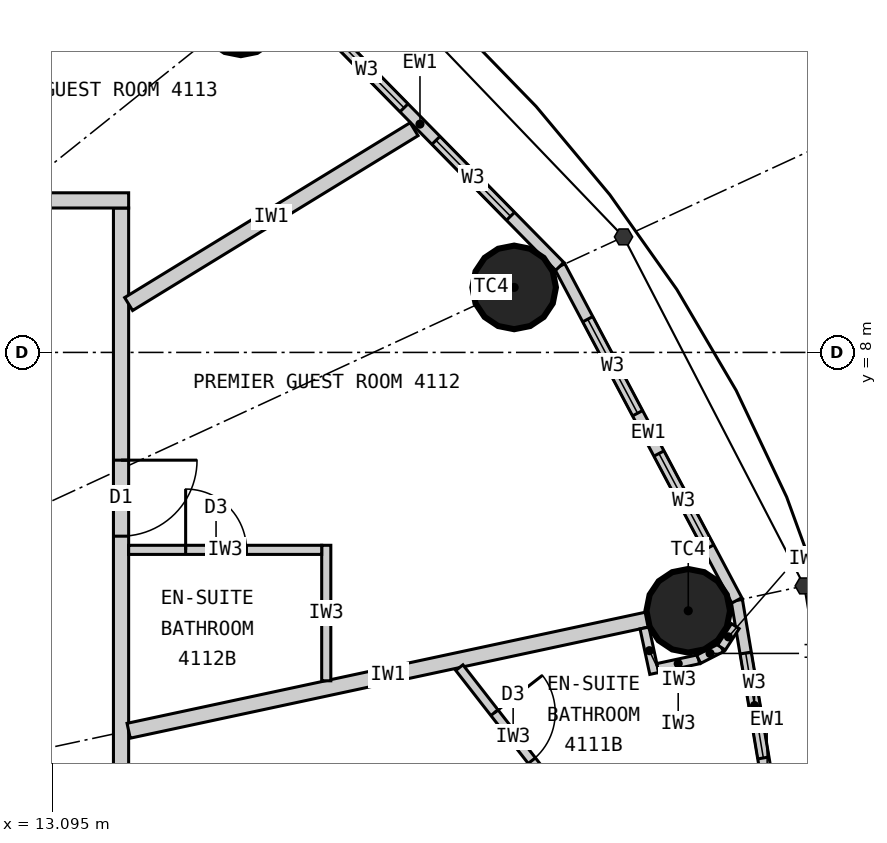
"""IFC4 building model, lengths in metres.
Left out: names, types, materials, properties, quantities, classifications, styles, units other than length and angle.
Written with IfcOpenShell. Run it as: python <this file> out.ifc"""

import sys

from ifc_helpers import new_model, si_unit, direction, frame, frame_2d, origin, origin_2d, place, context, subcontext, project, spatial, rectangle, circle, extrude, element, fill, save


model = new_model("IFC4")
c1 = context("Model", 3, precision=1e-05, world=origin(), true_north=direction((0.0, 1.0)))
c2 = subcontext(c1, "Body", "Model", "MODEL_VIEW")
j1 = project(units=[si_unit("LENGTHUNIT", "METRE"), si_unit("PLANEANGLEUNIT", "RADIAN")], contexts=[c1])
p1 = place(None, origin())
s1 = spatial("IfcSite", under=j1, at=p1, CompositionType="ELEMENT")
p2 = place(p1, origin())
s2 = spatial("IfcBuilding", under=s1, at=p2, CompositionType="ELEMENT")
p3 = place(p2, frame((0.0, 0.0, 156.6)))
s3 = spatial("IfcBuildingStorey", under=s2, at=p3, CompositionType="ELEMENT", Elevation=156.6)
for number, where, z_axis, x_axis in (
    (1, (21.463, 4.601, 0.0), (0.0, 0.0, 1.0), (1.0, 0.0, 0.0)),
    (2, (19.172, 8.855, 0.0), (0.0, 0.0, 1.0), (1.0, 0.0, 0.0)),
    (3, (15.576, 12.461, 0.0), (0.0, 0.0, 1.0), (1.0, 0.0, 0.0)),
):
    element("IfcColumn", number, at=place(p3, frame(where, z_axis=z_axis, x_axis=x_axis)), inside=s3, PredefinedType="COLUMN", context=c2, shape_type="SweptSolid", body=[
        extrude(circle(Radius=0.55, at=origin_2d()), origin(), (0.0, 0.0, 1.0), 3.3),
    ])
p4 = place(p3, frame((22.9, 0.0, 0.0), z_axis=(0.0, 0.0, 1.0), x_axis=(-0.166162111254, 0.986098449843, 0.0)))
e4 = element("IfcWall", 4, at=p4, inside=s3, PredefinedType="ELEMENTEDWALL", context=c2, shape_type="SweptSolid", body=[
    extrude(rectangle(XDim=4.805, YDim=0.15, at=frame_2d((2.402, 0.0))), origin(), (0.0, 0.0, 1.0), 3.12),
])
p5 = place(p4, frame((0.702, 0.0, 0.9)))
e5 = element("IfcOpeningElement", 5, at=p5, cuts=e4, PredefinedType="OPENING", context=c2, shape_type="SweptSolid", body=[
    extrude(rectangle(XDim=1.4, YDim=1.9, at=frame_2d((0.7, 0.95))), frame((0.0, 0.085, 0.0), z_axis=(0.0, -1.0, 0.0), x_axis=(1.0, 0.0, 0.0)), (0.0, 0.0, 1.0), 0.17),
])
p6 = place(p4, frame((2.702, 0.0, 0.9)))
e6 = element("IfcOpeningElement", 6, at=p6, cuts=e4, PredefinedType="OPENING", context=c2, shape_type="SweptSolid", body=[
    extrude(rectangle(XDim=1.4, YDim=1.9, at=frame_2d((0.7, 0.95))), frame((0.0, 0.085, 0.0), z_axis=(0.0, -1.0, 0.0), x_axis=(1.0, 0.0, 0.0)), (0.0, 0.0, 1.0), 0.17),
])
p7 = place(p3, frame((22.102, 4.738, 0.0), z_axis=(0.0, 0.0, 1.0), x_axis=(-0.468428906714, 0.883501193748, 0.0)))
e7 = element("IfcWall", 7, at=p7, inside=s3, PredefinedType="ELEMENTEDWALL", context=c2, shape_type="SweptSolid", body=[
    extrude(rectangle(XDim=4.974, YDim=0.15, at=frame_2d((2.487, 0.0))), origin(), (0.0, 0.0, 1.0), 3.12),
])
p8 = place(p7, frame((0.787, 0.0, 0.9)))
e8 = element("IfcOpeningElement", 8, at=p8, cuts=e7, PredefinedType="OPENING", context=c2, shape_type="SweptSolid", body=[
    extrude(rectangle(XDim=1.4, YDim=1.9, at=frame_2d((0.7, 0.95))), frame((0.0, 0.085, 0.0), z_axis=(0.0, -1.0, 0.0), x_axis=(1.0, 0.0, 0.0)), (0.0, 0.0, 1.0), 0.17),
])
p9 = place(p7, frame((2.787, 0.0, 0.9)))
e9 = element("IfcOpeningElement", 9, at=p9, cuts=e7, PredefinedType="OPENING", context=c2, shape_type="SweptSolid", body=[
    extrude(rectangle(XDim=1.4, YDim=1.9, at=frame_2d((0.7, 0.95))), frame((0.0, 0.085, 0.0), z_axis=(0.0, -1.0, 0.0), x_axis=(1.0, 0.0, 0.0)), (0.0, 0.0, 1.0), 0.17),
])
p10 = place(p3, frame((19.772, 9.132, 0.0), z_axis=(0.0, 0.0, 1.0), x_axis=(-0.700727467776, 0.71342905457, 0.0)))
e10 = element("IfcWall", 10, at=p10, inside=s3, PredefinedType="ELEMENTEDWALL", context=c2, shape_type="SweptSolid", body=[
    extrude(rectangle(XDim=5.247, YDim=0.15, at=frame_2d((2.624, 0.0))), origin(), (0.0, 0.0, 1.0), 3.12),
])
p11 = place(p10, frame((0.924, 0.0, 0.9)))
e11 = element("IfcOpeningElement", 11, at=p11, cuts=e10, PredefinedType="OPENING", context=c2, shape_type="SweptSolid", body=[
    extrude(rectangle(XDim=1.4, YDim=1.9, at=frame_2d((0.7, 0.95))), frame((0.0, 0.085, 0.0), z_axis=(0.0, -1.0, 0.0), x_axis=(1.0, 0.0, 0.0)), (0.0, 0.0, 1.0), 0.17),
])
p12 = place(p10, frame((2.924, 0.0, 0.9)))
e12 = element("IfcOpeningElement", 12, at=p12, cuts=e10, PredefinedType="OPENING", context=c2, shape_type="SweptSolid", body=[
    extrude(rectangle(XDim=1.4, YDim=1.9, at=frame_2d((0.7, 0.95))), frame((0.0, 0.085, 0.0), z_axis=(0.0, -1.0, 0.0), x_axis=(1.0, 0.0, 0.0)), (0.0, 0.0, 1.0), 0.17),
])
p13 = place(p3, frame((14.0, -9.9, 0.0), z_axis=(0.0, 0.0, 1.0), x_axis=(0.0, 1.0, 0.0)))
e13 = element("IfcWall", 13, at=p13, inside=s3, PredefinedType="PARTITIONING", context=c2, shape_type="SweptSolid", body=[
    extrude(rectangle(XDim=19.8, YDim=0.2, at=frame_2d((9.9, 0.0))), origin(), (0.0, 0.0, 1.0), 3.12),
])
p14 = place(p13, frame((3.824, 0.0, 0.0)))
e14 = element("IfcOpeningElement", 14, at=p14, cuts=e13, PredefinedType="OPENING", context=c2, shape_type="SweptSolid", body=[
    extrude(rectangle(XDim=1.0, YDim=2.2, at=frame_2d((0.5, 1.1))), frame((0.0, 0.11, 0.0), z_axis=(0.0, -1.0, 0.0), x_axis=(1.0, 0.0, 0.0)), (0.0, 0.0, 1.0), 0.22),
])
p15 = place(p13, frame((8.719, 0.0, 0.0)))
e15 = element("IfcOpeningElement", 15, at=p15, cuts=e13, PredefinedType="OPENING", context=c2, shape_type="SweptSolid", body=[
    extrude(rectangle(XDim=1.0, YDim=2.2, at=frame_2d((0.5, 1.1))), frame((0.0, 0.11, 0.0), z_axis=(0.0, -1.0, 0.0), x_axis=(1.0, 0.0, 0.0)), (0.0, 0.0, 1.0), 0.22),
])
p16 = place(p13, frame((15.482, 0.0, 0.0)))
e16 = element("IfcOpeningElement", 16, at=p16, cuts=e13, PredefinedType="OPENING", context=c2, shape_type="SweptSolid", body=[
    extrude(rectangle(XDim=1.0, YDim=2.2, at=frame_2d((0.5, 1.1))), frame((0.0, 0.11, 0.0), z_axis=(0.0, -1.0, 0.0), x_axis=(1.0, 0.0, 0.0)), (0.0, 0.0, 1.0), 0.22),
])
p17 = place(p3, frame((14.1, 3.022, 0.0), z_axis=(0.0, 0.0, 1.0), x_axis=(0.977790639684, 0.209584028367, 0.0)))
e17 = element("IfcWall", 17, at=p17, inside=s3, PredefinedType="PARTITIONING", context=c2, shape_type="SweptSolid", body=[
    extrude(rectangle(XDim=6.98, YDim=0.2, at=frame_2d((3.49, 0.0))), origin(), (0.0, 0.0, 1.0), 2.42),
])
p18 = place(p3, frame((14.1, 8.636, 0.0), z_axis=(0.0, 0.0, 1.0), x_axis=(0.852731884196, 0.522348862041, 0.0)))
e18 = element("IfcWall", 18, at=p18, inside=s3, PredefinedType="PARTITIONING", context=c2, shape_type="SweptSolid", body=[
    extrude(rectangle(XDim=4.404, YDim=0.2, at=frame_2d((2.202, 0.0))), origin(), (0.0, 0.0, 1.0), 3.12),
])
p19 = place(p3, frame((18.451, 3.853, 0.0), z_axis=(0.0, 0.0, 1.0), x_axis=(0.614703538382, -0.788758239197, 0.0)))
e19 = element("IfcWall", 19, at=p19, inside=s3, PredefinedType="PARTITIONING", context=c2, shape_type="SweptSolid", body=[
    extrude(rectangle(XDim=2.303, YDim=0.12, at=frame_2d((1.152, 0.0))), origin(), (0.0, 0.0, 1.0), 3.12),
])
p20 = place(p19, frame((0.752, 0.0, 0.0)))
e20 = element("IfcOpeningElement", 20, at=p20, cuts=e19, PredefinedType="OPENING", context=c2, shape_type="SweptSolid", body=[
    extrude(rectangle(XDim=0.8, YDim=2.1, at=frame_2d((0.4, 1.05))), frame((0.0, 0.07, 0.0), z_axis=(0.0, -1.0, 0.0), x_axis=(1.0, 0.0, 0.0)), (0.0, 0.0, 1.0), 0.14),
])
p21 = place(p3, frame((20.887, 4.375, 0.0), z_axis=(0.0, 0.0, 1.0), x_axis=(0.209746941802, -0.977755705892, 0.0)))
e21 = element("IfcWall", 21, at=p21, inside=s3, PredefinedType="PARTITIONING", context=c2, shape_type="SweptSolid", body=[
    extrude(rectangle(XDim=0.612, YDim=0.12, at=frame_2d((0.306, 0.0))), origin(), (0.0, 0.0, 1.0), 3.12),
])
p22 = place(p3, frame((21.062, 3.848, 0.0), z_axis=(0.0, 0.0, 1.0), x_axis=(0.977789415726, 0.209589738521, 0.0)))
e22 = element("IfcWall", 22, at=p22, inside=s3, PredefinedType="PARTITIONING", context=c2, shape_type="SweptSolid", body=[
    extrude(rectangle(XDim=0.55, YDim=0.12, at=frame_2d((0.275, 0.0))), origin(), (0.0, 0.0, 1.0), 3.12),
])
p23 = place(p3, frame((21.599, 3.963, 0.0), z_axis=(0.0, 0.0, 1.0), x_axis=(0.890193602875, 0.455582428766, 0.0)))
e23 = element("IfcWall", 23, at=p23, inside=s3, PredefinedType="PARTITIONING", context=c2, shape_type="SweptSolid", body=[
    extrude(rectangle(XDim=0.338, YDim=0.12, at=frame_2d((0.169, 0.0))), origin(), (0.0, 0.0, 1.0), 3.12),
])
p24 = place(p3, frame((21.9, 4.117, 0.0), z_axis=(0.0, 0.0, 1.0), x_axis=(0.543582688681, 0.839355622228, 0.0)))
e24 = element("IfcWall", 24, at=p24, inside=s3, PredefinedType="PARTITIONING", context=c2, shape_type="SweptSolid", body=[
    extrude(rectangle(XDim=0.336, YDim=0.12, at=frame_2d((0.168, 0.0))), origin(), (0.0, 0.0, 1.0), 3.12),
])
p25 = place(p3, frame((16.7, 3.68, 0.0), z_axis=(0.0, 0.0, 1.0), x_axis=(0.0, 1.0, 0.0)))
e25 = element("IfcWall", 25, at=p25, inside=s3, PredefinedType="PARTITIONING", context=c2, shape_type="SweptSolid", body=[
    extrude(rectangle(XDim=1.783, YDim=0.12, at=frame_2d((0.891, 0.0))), origin(), (0.0, 0.0, 1.0), 3.12),
])
p26 = place(p3, frame((14.1, 5.403, 0.0), z_axis=(0.0, 0.0, 1.0), x_axis=(1.0, 0.0, 0.0)))
e26 = element("IfcWall", 26, at=p26, inside=s3, PredefinedType="PARTITIONING", context=c2, shape_type="SweptSolid", body=[
    extrude(rectangle(XDim=2.54, YDim=0.12, at=frame_2d((1.27, 0.0))), origin(), (0.0, 0.0, 1.0), 3.12),
])
p27 = place(p26, frame((0.75, 0.0, 0.0)))
e27 = element("IfcOpeningElement", 27, at=p27, cuts=e26, PredefinedType="OPENING", context=c2, shape_type="SweptSolid", body=[
    extrude(rectangle(XDim=0.8, YDim=2.1, at=frame_2d((0.4, 1.05))), frame((0.0, 0.07, 0.0), z_axis=(0.0, -1.0, 0.0), x_axis=(1.0, 0.0, 0.0)), (0.0, 0.0, 1.0), 0.14),
])
p28 = place(p3, frame((3.518, 10.0, 0.0), z_axis=(0.0, 0.0, 1.0), x_axis=(1.0, 0.0, 0.0)))
e28 = element("IfcWall", 28, at=p28, inside=s3, PredefinedType="PARTITIONING", context=c2, shape_type="SweptSolid", body=[
    extrude(rectangle(XDim=10.582, YDim=0.2, at=frame_2d((5.291, 0.0))), origin(), (0.0, 0.0, 1.0), 3.12),
])
p29 = place(p28, frame((4.621, 0.0, 0.0)))
e29 = element("IfcOpeningElement", 29, at=p29, cuts=e28, PredefinedType="OPENING", context=c2, shape_type="SweptSolid", body=[
    extrude(rectangle(XDim=1.0, YDim=2.2, at=frame_2d((0.5, 1.1))), frame((0.0, 0.11, 0.0), z_axis=(0.0, -1.0, 0.0), x_axis=(1.0, 0.0, 0.0)), (0.0, 0.0, 1.0), 0.22),
])
p30 = place(p6, origin())
e30 = element("IfcWindow", 30, at=p30, inside=s3, PartitioningType="SINGLE_PANEL", PredefinedType="WINDOW", context=c2, shape_type="SweptSolid", body=[
    extrude(rectangle(XDim=1.4, YDim=1.9, at=frame_2d((0.7, 0.95))), frame((0.0, 0.03, 0.0), z_axis=(0.0, -1.0, 0.0), x_axis=(1.0, 0.0, 0.0)), (0.0, 0.0, 1.0), 0.06),
])
fill(e6, e30)
p31 = place(p8, origin())
e31 = element("IfcWindow", 31, at=p31, inside=s3, PartitioningType="SINGLE_PANEL", PredefinedType="WINDOW", context=c2, shape_type="SweptSolid", body=[
    extrude(rectangle(XDim=1.4, YDim=1.9, at=frame_2d((0.7, 0.95))), frame((0.0, 0.03, 0.0), z_axis=(0.0, -1.0, 0.0), x_axis=(1.0, 0.0, 0.0)), (0.0, 0.0, 1.0), 0.06),
])
fill(e8, e31)
p32 = place(p9, origin())
e32 = element("IfcWindow", 32, at=p32, inside=s3, PartitioningType="SINGLE_PANEL", PredefinedType="WINDOW", context=c2, shape_type="SweptSolid", body=[
    extrude(rectangle(XDim=1.4, YDim=1.9, at=frame_2d((0.7, 0.95))), frame((0.0, 0.03, 0.0), z_axis=(0.0, -1.0, 0.0), x_axis=(1.0, 0.0, 0.0)), (0.0, 0.0, 1.0), 0.06),
])
fill(e9, e32)
p33 = place(p11, origin())
e33 = element("IfcWindow", 33, at=p33, inside=s3, PartitioningType="SINGLE_PANEL", PredefinedType="WINDOW", context=c2, shape_type="SweptSolid", body=[
    extrude(rectangle(XDim=1.4, YDim=1.9, at=frame_2d((0.7, 0.95))), frame((0.0, 0.03, 0.0), z_axis=(0.0, -1.0, 0.0), x_axis=(1.0, 0.0, 0.0)), (0.0, 0.0, 1.0), 0.06),
])
fill(e11, e33)
p34 = place(p12, origin())
e34 = element("IfcWindow", 34, at=p34, inside=s3, PartitioningType="SINGLE_PANEL", PredefinedType="WINDOW", context=c2, shape_type="SweptSolid", body=[
    extrude(rectangle(XDim=1.4, YDim=1.9, at=frame_2d((0.7, 0.95))), frame((0.0, 0.03, 0.0), z_axis=(0.0, -1.0, 0.0), x_axis=(1.0, 0.0, 0.0)), (0.0, 0.0, 1.0), 0.06),
])
fill(e12, e34)
p35 = place(p20, origin())
e35 = element("IfcDoor", 35, at=p35, inside=s3, OperationType="SINGLE_SWING_LEFT", PredefinedType="DOOR", context=c2, shape_type="SweptSolid", body=[
    extrude(rectangle(XDim=0.8, YDim=2.1, at=frame_2d((0.4, 1.05))), frame((0.0, 0.025, 0.0), z_axis=(0.0, -1.0, 0.0), x_axis=(1.0, 0.0, 0.0)), (0.0, 0.0, 1.0), 0.05),
])
fill(e20, e35)
p36 = place(p27, origin())
e36 = element("IfcDoor", 36, at=p36, inside=s3, OperationType="SINGLE_SWING_LEFT", PredefinedType="DOOR", context=c2, shape_type="SweptSolid", body=[
    extrude(rectangle(XDim=0.8, YDim=2.1, at=frame_2d((0.4, 1.05))), frame((0.0, 0.025, 0.0), z_axis=(0.0, -1.0, 0.0), x_axis=(1.0, 0.0, 0.0)), (0.0, 0.0, 1.0), 0.05),
])
fill(e27, e36)
p37 = place(p16, origin())
e37 = element("IfcDoor", 37, at=p37, inside=s3, OperationType="SINGLE_SWING_RIGHT", PredefinedType="DOOR", context=c2, shape_type="SweptSolid", body=[
    extrude(rectangle(XDim=1.0, YDim=2.2, at=frame_2d((0.5, 1.1))), frame((0.0, 0.025, 0.0), z_axis=(0.0, -1.0, 0.0), x_axis=(1.0, 0.0, 0.0)), (0.0, 0.0, 1.0), 0.05),
])
fill(e16, e37)
save(model, sys.argv[1])
